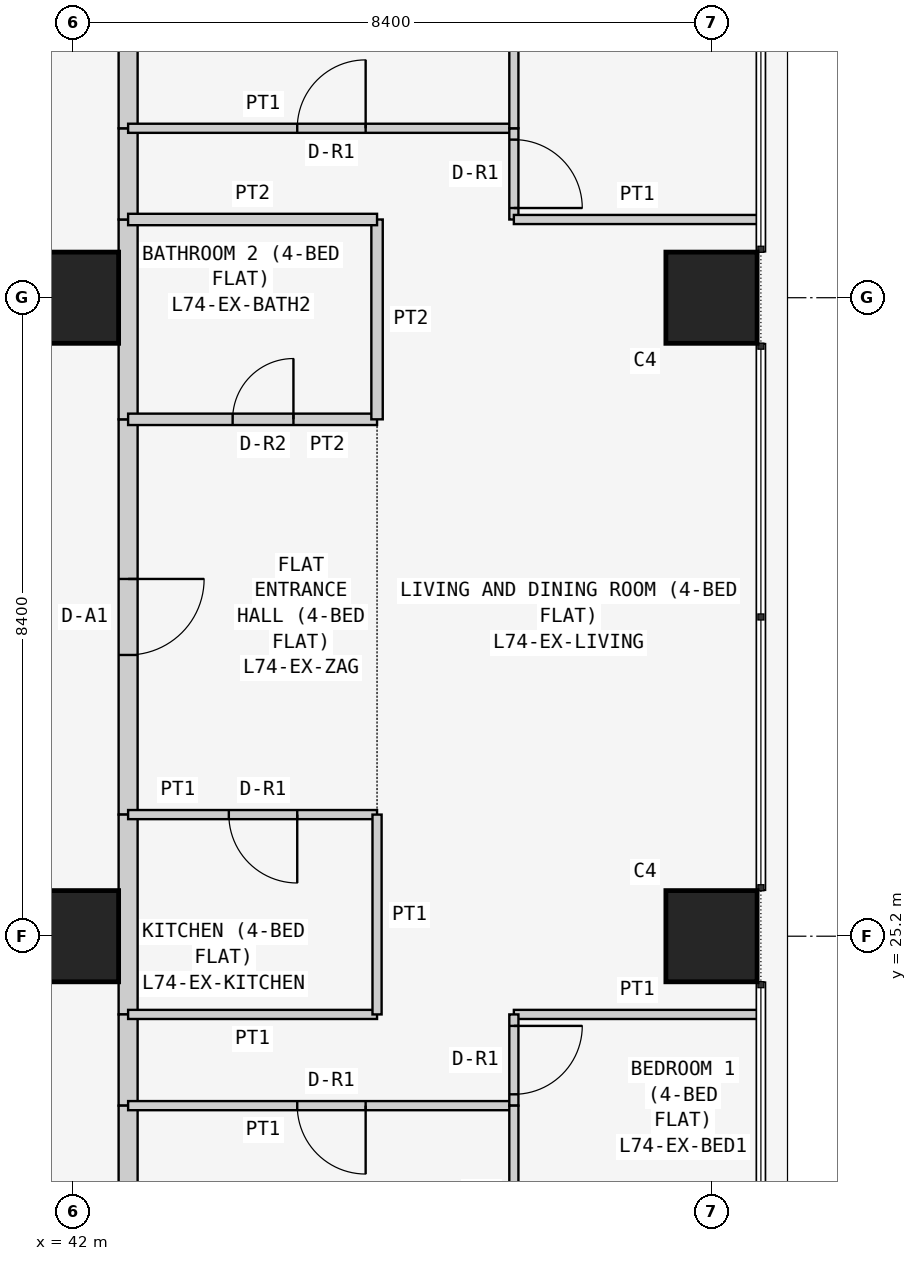
"""IFC4 building model, lengths in metres.
Left out: names, types, materials, properties, quantities, classifications, styles, units other than length and angle.
Written with IfcOpenShell. Run it as: python <this file> out.ifc"""

import sys

from ifc_helpers import new_model, si_unit, direction, frame, frame_2d, origin, origin_2d, place, context, subcontext, project, spatial, rectangle, extrude, element, fill, save


model = new_model("IFC4")
c1 = context("Model", 3, precision=1e-05, world=origin(), true_north=direction((0.0, 1.0)))
c2 = subcontext(c1, "Body", "Model", "MODEL_VIEW")
j1 = project(units=[si_unit("LENGTHUNIT", "METRE"), si_unit("PLANEANGLEUNIT", "RADIAN")], contexts=[c1])
p1 = place(None, origin())
s1 = spatial("IfcSite", under=j1, at=p1, CompositionType="ELEMENT")
p2 = place(p1, origin())
s2 = spatial("IfcBuilding", under=s1, at=p2, CompositionType="ELEMENT")
p3 = place(p2, frame((0.0, 0.0, 282.9)))
s3 = spatial("IfcBuildingStorey", under=s2, at=p3, CompositionType="ELEMENT", Elevation=282.9)
for number, where, z_axis, x_axis in (
    (1, (42.0, 25.2, 0.0), (0.0, 0.0, 1.0), (1.0, 0.0, 0.0)),
    (2, (42.0, 33.6, 0.0), (0.0, 0.0, 1.0), (1.0, 0.0, 0.0)),
    (3, (50.4, 25.2, 0.0), (0.0, 0.0, 1.0), (1.0, 0.0, 0.0)),
    (4, (50.4, 33.6, 0.0), (0.0, 0.0, 1.0), (1.0, 0.0, 0.0)),
):
    element("IfcColumn", number, at=place(p3, frame(where, z_axis=z_axis, x_axis=x_axis)), inside=s3, PredefinedType="COLUMN", context=c2, shape_type="SweptSolid", body=[
        extrude(rectangle(XDim=1.2, YDim=1.2, at=origin_2d()), origin(), (0.0, 0.0, 1.0), 3.6),
    ])
p4 = place(p3, frame((42.725, 32.0, 0.0), z_axis=(0.0, 0.0, 1.0), x_axis=(0.0, -1.0, 0.0)))
e5 = element("IfcWall", 5, at=p4, inside=s3, PredefinedType="PARTITIONING", context=c2, shape_type="SweptSolid", body=[
    extrude(rectangle(XDim=5.2, YDim=0.25, at=frame_2d((2.6, 0.0))), origin(), (0.0, 0.0, 1.0), 3.45),
])
p5 = place(p4, frame((2.1, 0.0, 0.0)))
e6 = element("IfcOpeningElement", 6, at=p5, cuts=e5, PredefinedType="OPENING", context=c2, shape_type="SweptSolid", body=[
    extrude(rectangle(XDim=1.0, YDim=2.1, at=frame_2d((0.5, 1.05))), frame((0.0, 0.135, 0.0), z_axis=(0.0, -1.0, 0.0), x_axis=(1.0, 0.0, 0.0)), (0.0, 0.0, 1.0), 0.27),
])
p6 = place(p3, frame((42.725, 34.629, 0.0), z_axis=(0.0, 0.0, 1.0), x_axis=(0.0, -1.0, 0.0)))
e7 = element("IfcWall", 7, at=p6, inside=s3, PredefinedType="PARTITIONING", context=c2, shape_type="SweptSolid", body=[
    extrude(rectangle(XDim=2.629, YDim=0.25, at=frame_2d((1.314, 0.0))), origin(), (0.0, 0.0, 1.0), 3.45),
])
p7 = place(p3, frame((42.725, 26.8, 0.0), z_axis=(0.0, 0.0, 1.0), x_axis=(0.0, -1.0, 0.0)))
e8 = element("IfcWall", 8, at=p7, inside=s3, PredefinedType="PARTITIONING", context=c2, shape_type="SweptSolid", body=[
    extrude(rectangle(XDim=2.629, YDim=0.25, at=frame_2d((1.314, 0.0))), origin(), (0.0, 0.0, 1.0), 3.45),
])
p8 = place(p3, frame((42.725, 24.171, 0.0), z_axis=(0.0, 0.0, 1.0), x_axis=(0.0, -1.0, 0.0)))
e9 = element("IfcWall", 9, at=p8, inside=s3, PredefinedType="PARTITIONING", context=c2, shape_type="SweptSolid", body=[
    extrude(rectangle(XDim=1.2, YDim=0.25, at=frame_2d((0.6, 0.0))), origin(), (0.0, 0.0, 1.0), 3.45),
])
p9 = place(p3, frame((42.725, 35.829, 0.0), z_axis=(0.0, 0.0, 1.0), x_axis=(0.0, -1.0, 0.0)))
e10 = element("IfcWall", 10, at=p9, inside=s3, PredefinedType="PARTITIONING", context=c2, shape_type="SweptSolid", body=[
    extrude(rectangle(XDim=1.2, YDim=0.25, at=frame_2d((0.6, 0.0))), origin(), (0.0, 0.0, 1.0), 3.45),
])
for number, where, z_axis, x_axis in (
    (11, (42.725, 42.7, 0.0), (0.0, 0.0, 1.0), (0.0, -1.0, 0.0)),
    (12, (42.725, 22.971, 0.0), (0.0, 0.0, 1.0), (0.0, -1.0, 0.0)),
):
    element("IfcWall", number, at=place(p3, frame(where, z_axis=z_axis, x_axis=x_axis)), inside=s3, PredefinedType="PARTITIONING", context=c2, shape_type="SweptSolid", body=[
        extrude(rectangle(XDim=6.871, YDim=0.25, at=frame_2d((3.436, 0.0))), origin(), (0.0, 0.0, 1.0), 3.45),
    ])
p10 = place(p3, frame((46.0, 32.0, 0.0), z_axis=(0.0, 0.0, 1.0), x_axis=(-1.0, 0.0, 0.0)))
e13 = element("IfcWall", 13, at=p10, inside=s3, PredefinedType="PARTITIONING", context=c2, shape_type="SweptSolid", body=[
    extrude(rectangle(XDim=3.275, YDim=0.15, at=frame_2d((1.637, 0.0))), origin(), (0.0, 0.0, 1.0), 3.45),
])
p11 = place(p10, frame((1.1, 0.0, 0.0)))
e14 = element("IfcOpeningElement", 14, at=p11, cuts=e13, PredefinedType="OPENING", context=c2, shape_type="SweptSolid", body=[
    extrude(rectangle(XDim=0.8, YDim=2.1, at=frame_2d((0.4, 1.05))), frame((0.0, 0.085, 0.0), z_axis=(0.0, -1.0, 0.0), x_axis=(1.0, 0.0, 0.0)), (0.0, 0.0, 1.0), 0.17),
])
p12 = place(p3, frame((42.725, 26.8, 0.0), z_axis=(0.0, 0.0, 1.0), x_axis=(1.0, 0.0, 0.0)))
e15 = element("IfcWall", 15, at=p12, inside=s3, PredefinedType="PARTITIONING", context=c2, shape_type="SweptSolid", body=[
    extrude(rectangle(XDim=3.275, YDim=0.12, at=frame_2d((1.637, 0.0))), origin(), (0.0, 0.0, 1.0), 3.45),
])
p13 = place(p12, frame((1.325, 0.0, 0.0)))
e16 = element("IfcOpeningElement", 16, at=p13, cuts=e15, PredefinedType="OPENING", context=c2, shape_type="SweptSolid", body=[
    extrude(rectangle(XDim=0.9, YDim=2.1, at=frame_2d((0.45, 1.05))), frame((0.0, 0.07, 0.0), z_axis=(0.0, -1.0, 0.0), x_axis=(1.0, 0.0, 0.0)), (0.0, 0.0, 1.0), 0.14),
])
p14 = place(p3, frame((46.0, 32.0, 0.0), z_axis=(0.0, 0.0, 1.0), x_axis=(0.0, 1.0, 0.0)))
e17 = element("IfcWall", 17, at=p14, inside=s3, PredefinedType="PARTITIONING", context=c2, shape_type="SweptSolid", body=[
    extrude(rectangle(XDim=2.629, YDim=0.15, at=frame_2d((1.314, 0.0))), origin(), (0.0, 0.0, 1.0), 3.45),
])
p15 = place(p3, frame((46.0, 34.629, 0.0), z_axis=(0.0, 0.0, 1.0), x_axis=(-1.0, 0.0, 0.0)))
e18 = element("IfcWall", 18, at=p15, inside=s3, PredefinedType="PARTITIONING", context=c2, shape_type="SweptSolid", body=[
    extrude(rectangle(XDim=3.275, YDim=0.15, at=frame_2d((1.637, 0.0))), origin(), (0.0, 0.0, 1.0), 3.45),
])
p16 = place(p3, frame((42.725, 24.171, 0.0), z_axis=(0.0, 0.0, 1.0), x_axis=(1.0, 0.0, 0.0)))
e19 = element("IfcWall", 19, at=p16, inside=s3, PredefinedType="PARTITIONING", context=c2, shape_type="SweptSolid", body=[
    extrude(rectangle(XDim=3.275, YDim=0.12, at=frame_2d((1.637, 0.0))), origin(), (0.0, 0.0, 1.0), 3.45),
])
p17 = place(p3, frame((46.0, 24.171, 0.0), z_axis=(0.0, 0.0, 1.0), x_axis=(0.0, 1.0, 0.0)))
e20 = element("IfcWall", 20, at=p17, inside=s3, PredefinedType="PARTITIONING", context=c2, shape_type="SweptSolid", body=[
    extrude(rectangle(XDim=2.629, YDim=0.12, at=frame_2d((1.314, 0.0))), origin(), (0.0, 0.0, 1.0), 3.45),
])
p18 = place(p3, frame((42.725, 35.829, 0.0), z_axis=(0.0, 0.0, 1.0), x_axis=(1.0, 0.0, 0.0)))
e21 = element("IfcWall", 21, at=p18, inside=s3, PredefinedType="PARTITIONING", context=c2, shape_type="SweptSolid", body=[
    extrude(rectangle(XDim=5.075, YDim=0.12, at=frame_2d((2.538, 0.0))), origin(), (0.0, 0.0, 1.0), 3.45),
])
p19 = place(p18, frame((2.225, 0.0, 0.0)))
e22 = element("IfcOpeningElement", 22, at=p19, cuts=e21, PredefinedType="OPENING", context=c2, shape_type="SweptSolid", body=[
    extrude(rectangle(XDim=0.9, YDim=2.1, at=frame_2d((0.45, 1.05))), frame((0.0, 0.07, 0.0), z_axis=(0.0, -1.0, 0.0), x_axis=(1.0, 0.0, 0.0)), (0.0, 0.0, 1.0), 0.14),
])
p20 = place(p3, frame((47.8, 35.829, 0.0), z_axis=(0.0, 0.0, 1.0), x_axis=(0.0, -1.0, 0.0)))
e23 = element("IfcWall", 23, at=p20, inside=s3, PredefinedType="PARTITIONING", context=c2, shape_type="SweptSolid", body=[
    extrude(rectangle(XDim=1.2, YDim=0.12, at=frame_2d((0.6, 0.0))), origin(), (0.0, 0.0, 1.0), 3.45),
])
p21 = place(p20, frame((0.149, 0.0, 0.0)))
e24 = element("IfcOpeningElement", 24, at=p21, cuts=e23, PredefinedType="OPENING", context=c2, shape_type="SweptSolid", body=[
    extrude(rectangle(XDim=0.9, YDim=2.1, at=frame_2d((0.45, 1.05))), frame((0.0, 0.07, 0.0), z_axis=(0.0, -1.0, 0.0), x_axis=(1.0, 0.0, 0.0)), (0.0, 0.0, 1.0), 0.14),
])
p22 = place(p3, frame((47.8, 34.629, 0.0), z_axis=(0.0, 0.0, 1.0), x_axis=(1.0, 0.0, 0.0)))
e25 = element("IfcWall", 25, at=p22, inside=s3, PredefinedType="PARTITIONING", context=c2, shape_type="SweptSolid", body=[
    extrude(rectangle(XDim=3.25, YDim=0.12, at=frame_2d((1.625, 0.0))), origin(), (0.0, 0.0, 1.0), 3.45),
])
p23 = place(p3, frame((47.8, 22.971, 0.0), z_axis=(0.0, 0.0, 1.0), x_axis=(-1.0, 0.0, 0.0)))
e26 = element("IfcWall", 26, at=p23, inside=s3, PredefinedType="PARTITIONING", context=c2, shape_type="SweptSolid", body=[
    extrude(rectangle(XDim=5.075, YDim=0.12, at=frame_2d((2.538, 0.0))), origin(), (0.0, 0.0, 1.0), 3.45),
])
p24 = place(p23, frame((1.95, 0.0, 0.0)))
e27 = element("IfcOpeningElement", 27, at=p24, cuts=e26, PredefinedType="OPENING", context=c2, shape_type="SweptSolid", body=[
    extrude(rectangle(XDim=0.9, YDim=2.1, at=frame_2d((0.45, 1.05))), frame((0.0, 0.07, 0.0), z_axis=(0.0, -1.0, 0.0), x_axis=(1.0, 0.0, 0.0)), (0.0, 0.0, 1.0), 0.14),
])
p25 = place(p3, frame((51.05, 24.171, 0.0), z_axis=(0.0, 0.0, 1.0), x_axis=(-1.0, 0.0, 0.0)))
e28 = element("IfcWall", 28, at=p25, inside=s3, PredefinedType="PARTITIONING", context=c2, shape_type="SweptSolid", body=[
    extrude(rectangle(XDim=3.25, YDim=0.12, at=frame_2d((1.625, 0.0))), origin(), (0.0, 0.0, 1.0), 3.45),
])
p26 = place(p3, frame((47.8, 24.171, 0.0), z_axis=(0.0, 0.0, 1.0), x_axis=(0.0, -1.0, 0.0)))
e29 = element("IfcWall", 29, at=p26, inside=s3, PredefinedType="PARTITIONING", context=c2, shape_type="SweptSolid", body=[
    extrude(rectangle(XDim=1.2, YDim=0.12, at=frame_2d((0.6, 0.0))), origin(), (0.0, 0.0, 1.0), 3.45),
])
p27 = place(p26, frame((0.151, 0.0, 0.0)))
e30 = element("IfcOpeningElement", 30, at=p27, cuts=e29, PredefinedType="OPENING", context=c2, shape_type="SweptSolid", body=[
    extrude(rectangle(XDim=0.9, YDim=2.1, at=frame_2d((0.45, 1.05))), frame((0.0, 0.07, 0.0), z_axis=(0.0, -1.0, 0.0), x_axis=(1.0, 0.0, 0.0)), (0.0, 0.0, 1.0), 0.14),
])
p28 = place(p3, frame((47.8, 35.829, 0.0), z_axis=(0.0, 0.0, 1.0), x_axis=(0.0, 1.0, 0.0)))
e31 = element("IfcWall", 31, at=p28, inside=s3, PredefinedType="PARTITIONING", context=c2, shape_type="SweptSolid", body=[
    extrude(rectangle(XDim=6.871, YDim=0.12, at=frame_2d((3.436, 0.0))), origin(), (0.0, 0.0, 1.0), 3.45),
])
p29 = place(p3, frame((47.8, 20.686, 0.0), z_axis=(0.0, 0.0, 1.0), x_axis=(0.0, 1.0, 0.0)))
e32 = element("IfcWall", 32, at=p29, inside=s3, PredefinedType="PARTITIONING", context=c2, shape_type="SweptSolid", body=[
    extrude(rectangle(XDim=2.285, YDim=0.12, at=frame_2d((1.143, 0.0))), origin(), (0.0, 0.0, 1.0), 3.45),
])
p30 = place(p5, origin())
e33 = element("IfcDoor", 33, at=p30, inside=s3, OperationType="SINGLE_SWING_LEFT", PredefinedType="DOOR", context=c2, shape_type="SweptSolid", body=[
    extrude(rectangle(XDim=1.0, YDim=2.1, at=frame_2d((0.5, 1.05))), frame((0.0, 0.025, 0.0), z_axis=(0.0, -1.0, 0.0), x_axis=(1.0, 0.0, 0.0)), (0.0, 0.0, 1.0), 0.05),
])
fill(e6, e33)
p31 = place(p11, frame((0.8, 0.0, 0.0), z_axis=(0.0, 0.0, 1.0), x_axis=(-1.0, 0.0, 0.0)))
e34 = element("IfcDoor", 34, at=p31, inside=s3, OperationType="SINGLE_SWING_RIGHT", PredefinedType="DOOR", context=c2, shape_type="SweptSolid", body=[
    extrude(rectangle(XDim=0.8, YDim=2.1, at=frame_2d((0.4, 1.05))), frame((0.0, 0.025, 0.0), z_axis=(0.0, -1.0, 0.0), x_axis=(1.0, 0.0, 0.0)), (0.0, 0.0, 1.0), 0.05),
])
fill(e14, e34)
p32 = place(p13, frame((0.9, 0.0, 0.0), z_axis=(0.0, 0.0, 1.0), x_axis=(-1.0, 0.0, 0.0)))
e35 = element("IfcDoor", 35, at=p32, inside=s3, OperationType="SINGLE_SWING_LEFT", PredefinedType="DOOR", context=c2, shape_type="SweptSolid", body=[
    extrude(rectangle(XDim=0.9, YDim=2.1, at=frame_2d((0.45, 1.05))), frame((0.0, 0.025, 0.0), z_axis=(0.0, -1.0, 0.0), x_axis=(1.0, 0.0, 0.0)), (0.0, 0.0, 1.0), 0.05),
])
fill(e16, e35)
p33 = place(p19, origin())
e36 = element("IfcDoor", 36, at=p33, inside=s3, OperationType="SINGLE_SWING_RIGHT", PredefinedType="DOOR", context=c2, shape_type="SweptSolid", body=[
    extrude(rectangle(XDim=0.9, YDim=2.1, at=frame_2d((0.45, 1.05))), frame((0.0, 0.025, 0.0), z_axis=(0.0, -1.0, 0.0), x_axis=(1.0, 0.0, 0.0)), (0.0, 0.0, 1.0), 0.05),
])
fill(e22, e36)
p34 = place(p21, origin())
e37 = element("IfcDoor", 37, at=p34, inside=s3, OperationType="SINGLE_SWING_RIGHT", PredefinedType="DOOR", context=c2, shape_type="SweptSolid", body=[
    extrude(rectangle(XDim=0.9, YDim=2.1, at=frame_2d((0.45, 1.05))), frame((0.0, 0.025, 0.0), z_axis=(0.0, -1.0, 0.0), x_axis=(1.0, 0.0, 0.0)), (0.0, 0.0, 1.0), 0.05),
])
fill(e24, e37)
p35 = place(p24, origin())
e38 = element("IfcDoor", 38, at=p35, inside=s3, OperationType="SINGLE_SWING_LEFT", PredefinedType="DOOR", context=c2, shape_type="SweptSolid", body=[
    extrude(rectangle(XDim=0.9, YDim=2.1, at=frame_2d((0.45, 1.05))), frame((0.0, 0.025, 0.0), z_axis=(0.0, -1.0, 0.0), x_axis=(1.0, 0.0, 0.0)), (0.0, 0.0, 1.0), 0.05),
])
fill(e27, e38)
p36 = place(p27, origin())
e39 = element("IfcDoor", 39, at=p36, inside=s3, OperationType="SINGLE_SWING_LEFT", PredefinedType="DOOR", context=c2, shape_type="SweptSolid", body=[
    extrude(rectangle(XDim=0.9, YDim=2.1, at=frame_2d((0.45, 1.05))), frame((0.0, 0.025, 0.0), z_axis=(0.0, -1.0, 0.0), x_axis=(1.0, 0.0, 0.0)), (0.0, 0.0, 1.0), 0.05),
])
fill(e30, e39)
save(model, sys.argv[1])
